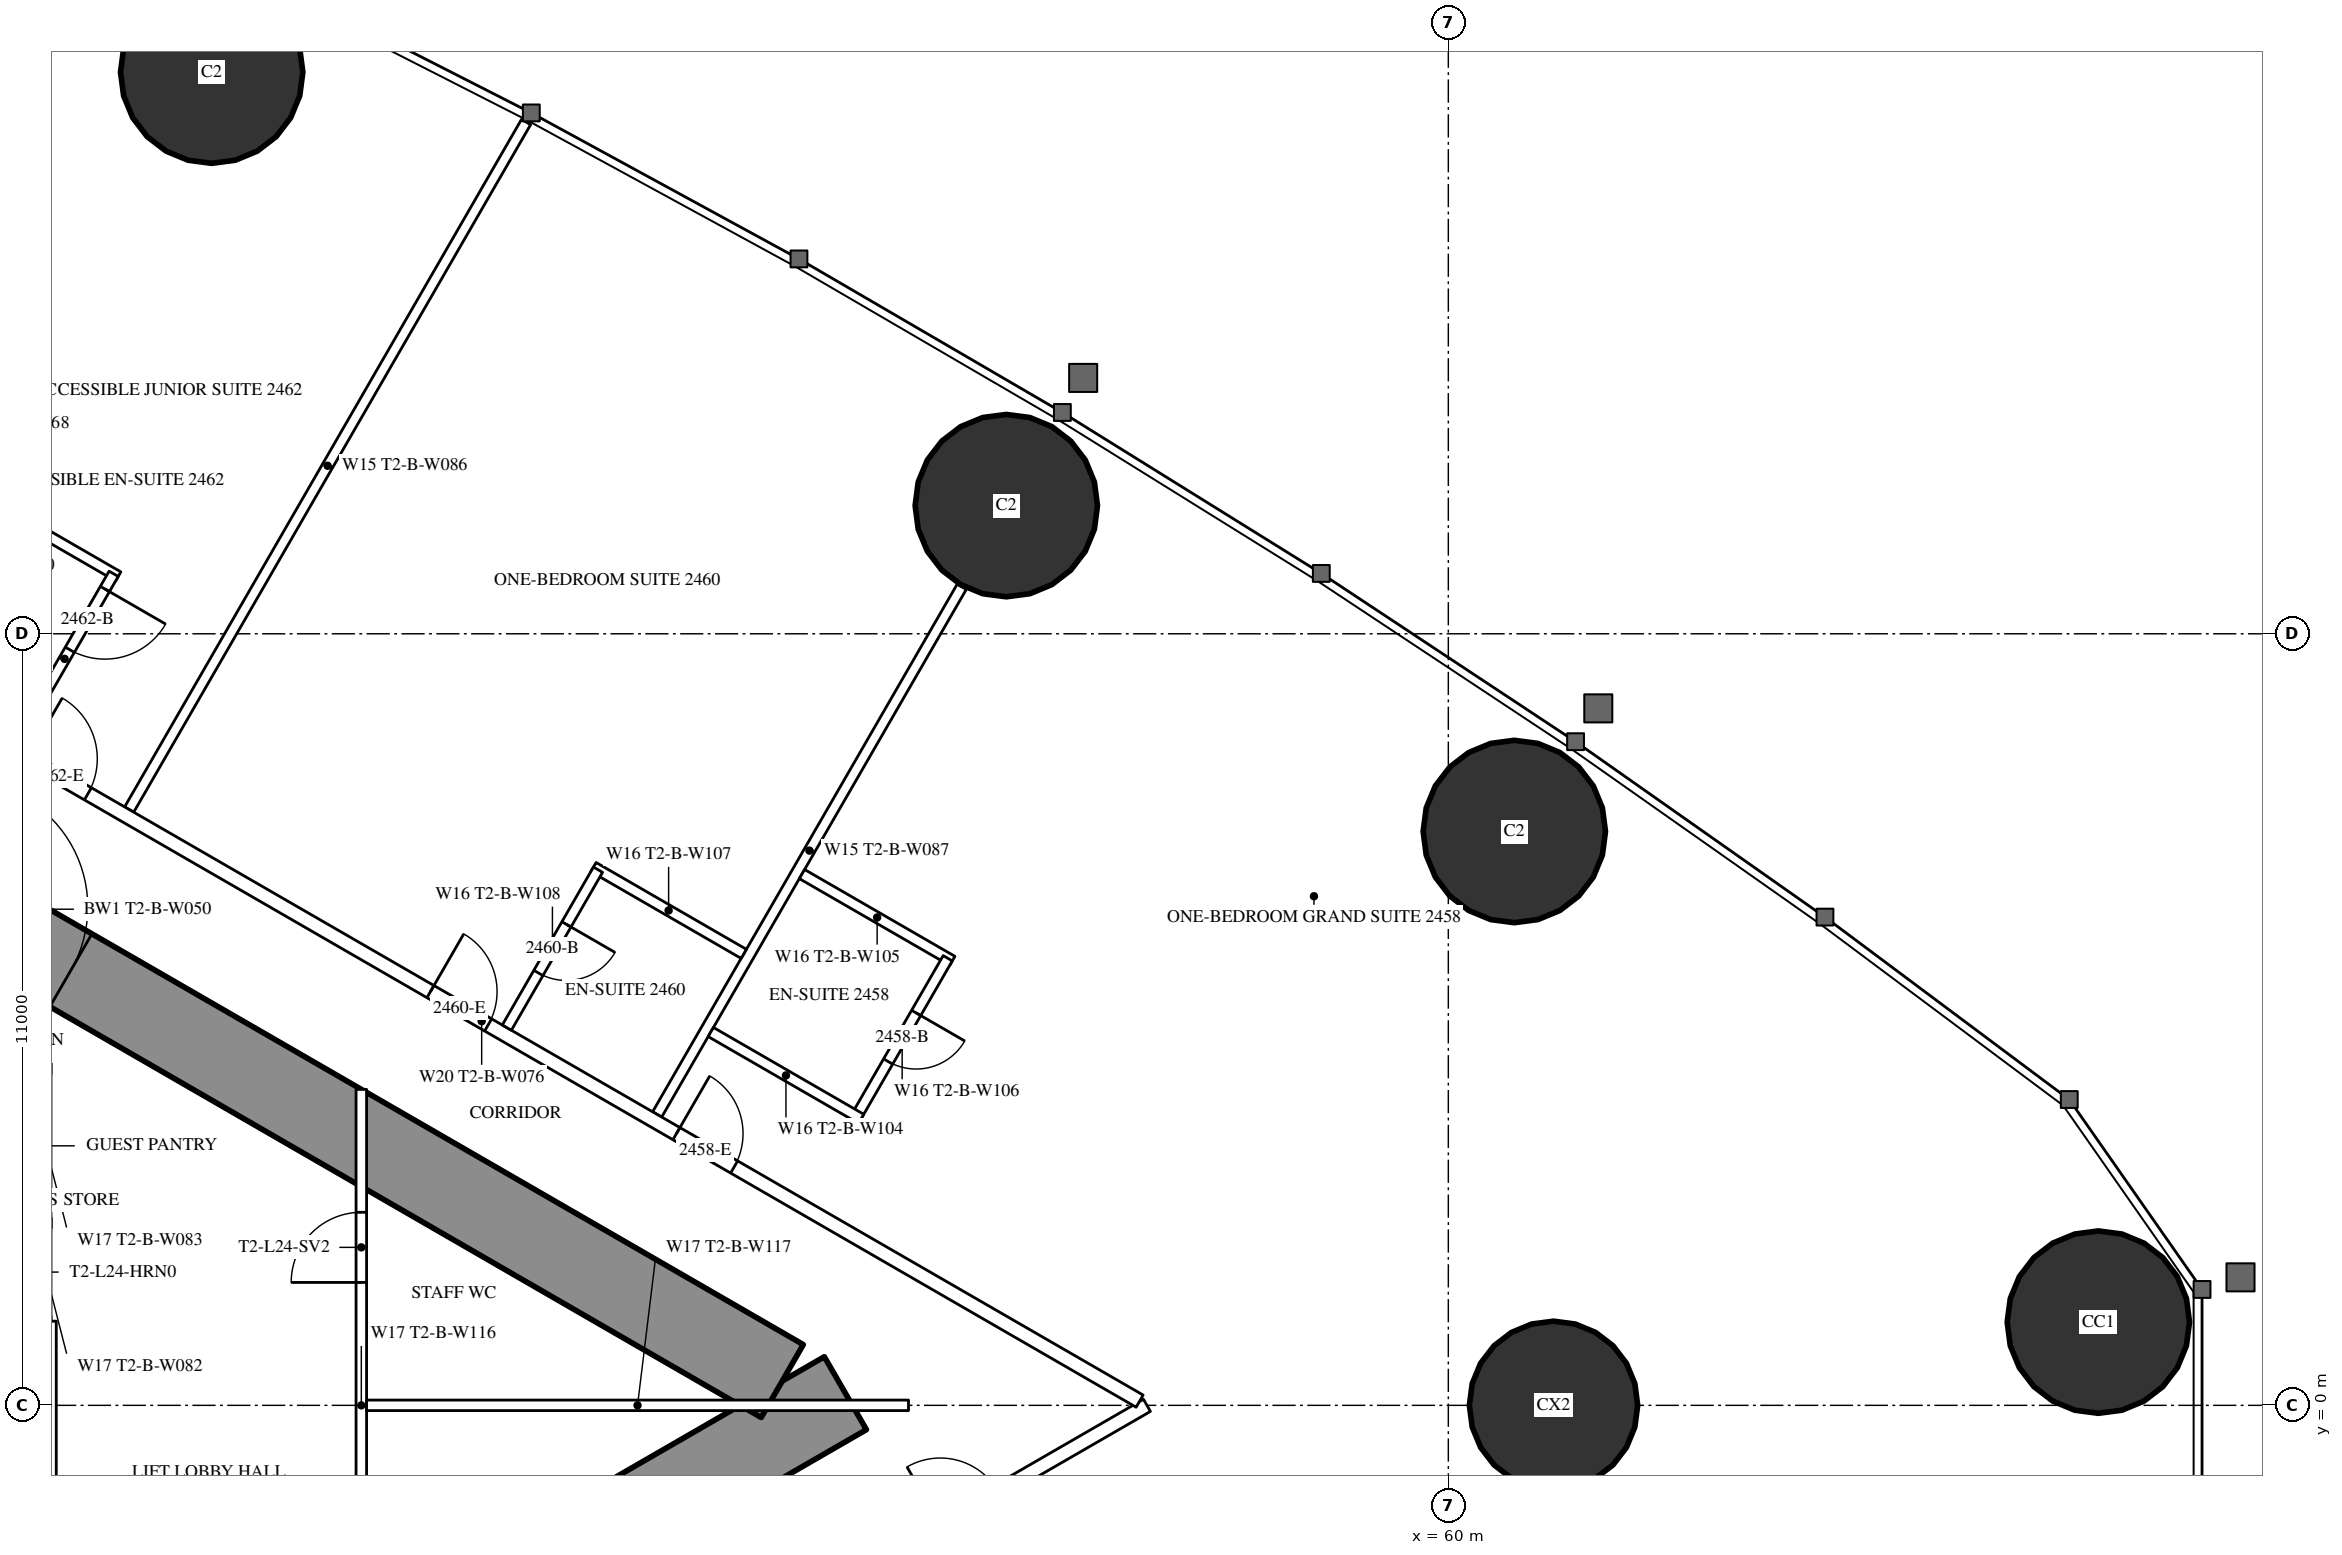
"""IFC4 building model, lengths in metres.
Left out: names, types, materials, properties, quantities, classifications, styles, units other than length and angle.
Written with IfcOpenShell. Run it as: python <this file> out.ifc"""

import sys

from ifc_helpers import new_model, si_unit, direction, frame, frame_2d, origin, origin_2d, place, context, subcontext, project, spatial, rectangle, circle, hollow_circle, extrude, element, fill, save


model = new_model("IFC4")
c1 = context("Model", 3, precision=1e-05, world=origin(), true_north=direction((0.0, 1.0)))
c2 = subcontext(c1, "Body", "Model", "MODEL_VIEW")
j1 = project(units=[si_unit("LENGTHUNIT", "METRE"), si_unit("PLANEANGLEUNIT", "RADIAN")], contexts=[c1])
p1 = place(None, origin())
s1 = spatial("IfcSite", under=j1, at=p1, CompositionType="ELEMENT")
p2 = place(p1, origin())
s2 = spatial("IfcBuilding", under=s1, at=p2, CompositionType="ELEMENT")
p3 = place(p2, frame((0.0, 0.0, 94.1)))
s3 = spatial("IfcBuildingStorey", under=s2, at=p3, CompositionType="ELEMENT", Elevation=94.1)
for number, where, z_axis, x_axis in (
    (1, (69.269, 1.187, 0.0), (0.0, 0.0, 1.0), (1.0, 0.0, 0.0)),
    (2, (60.941, 8.181, 0.0), (0.0, 0.0, 1.0), (1.0, 0.0, 0.0)),
    (3, (53.697, 12.827, 0.0), (0.0, 0.0, 1.0), (1.0, 0.0, 0.0)),
    (4, (42.366, 19.007, 0.0), (0.0, 0.0, 1.0), (1.0, 0.0, 0.0)),
):
    element("IfcColumn", number, at=place(p3, frame(where, z_axis=z_axis, x_axis=x_axis)), inside=s3, PredefinedType="COLUMN", context=c2, shape_type="SweptSolid", body=[
        extrude(hollow_circle(Radius=1.3, WallThickness=0.1, at=origin_2d()), origin(), (0.0, 0.0, 1.0), 3.5),
    ])
p4 = place(p3, frame((61.5, 0.0, 0.0), z_axis=(0.0, 0.0, 1.0), x_axis=(1.0, 0.0, 0.0)))
e5 = element("IfcColumn", 5, at=p4, inside=s3, PredefinedType="COLUMN", context=c2, shape_type="SweptSolid", body=[
    extrude(circle(Radius=1.2, at=origin_2d()), origin(), (0.0, 0.0, 1.0), 3.5),
])
p5 = place(p3, frame((27.2, -13.8, 0.0), z_axis=(0.0, 0.0, 1.0), x_axis=(0.866027159892, 0.499996958321, 0.0)))
e6 = element("IfcWall", 6, at=p5, inside=s3, PredefinedType="SHEAR", context=c2, shape_type="SweptSolid", body=[
    extrude(rectangle(XDim=27.947, YDim=1.2, at=frame_2d((13.973, 0.0))), origin(), (0.0, 0.0, 1.0), 3.5),
])
p6 = place(p5, frame((4.6, 0.0, 0.0)))
e7 = element("IfcOpeningElement", 7, at=p6, cuts=e6, PredefinedType="OPENING", context=c2, shape_type="SweptSolid", body=[
    extrude(rectangle(XDim=1.0, YDim=2.2, at=frame_2d((0.5, 1.1))), frame((0.0, 0.61, 0.0), z_axis=(0.0, -1.0, 0.0), x_axis=(1.0, 0.0, 0.0)), (0.0, 0.0, 1.0), 1.22),
])
p7 = place(p5, frame((13.395, 0.0, 0.0)))
e8 = element("IfcOpeningElement", 8, at=p7, cuts=e6, PredefinedType="OPENING", context=c2, shape_type="SweptSolid", body=[
    extrude(rectangle(XDim=1.8, YDim=2.2, at=frame_2d((0.9, 1.1))), frame((0.0, 0.61, 0.0), z_axis=(0.0, -1.0, 0.0), x_axis=(1.0, 0.0, 0.0)), (0.0, 0.0, 1.0), 1.22),
])
p8 = place(p3, frame((27.2, 13.8, 0.0), z_axis=(0.0, 0.0, 1.0), x_axis=(0.866024515034, -0.500001539357, 0.0)))
e9 = element("IfcWall", 9, at=p8, inside=s3, PredefinedType="SHEAR", context=c2, shape_type="SweptSolid", body=[
    extrude(rectangle(XDim=26.907, YDim=1.2, at=frame_2d((13.454, 0.0))), origin(), (0.0, 0.0, 1.0), 3.5),
])
p9 = place(p8, frame((4.6, 0.0, 0.0)))
e10 = element("IfcOpeningElement", 10, at=p9, cuts=e9, PredefinedType="OPENING", context=c2, shape_type="SweptSolid", body=[
    extrude(rectangle(XDim=1.0, YDim=2.2, at=frame_2d((0.5, 1.1))), frame((0.0, 0.61, 0.0), z_axis=(0.0, -1.0, 0.0), x_axis=(1.0, 0.0, 0.0)), (0.0, 0.0, 1.0), 1.22),
])
p10 = place(p8, frame((13.395, 0.0, 0.0)))
e11 = element("IfcOpeningElement", 11, at=p10, cuts=e9, PredefinedType="OPENING", context=c2, shape_type="SweptSolid", body=[
    extrude(rectangle(XDim=1.8, YDim=2.2, at=frame_2d((0.9, 1.1))), frame((0.0, 0.61, 0.0), z_axis=(0.0, -1.0, 0.0), x_axis=(1.0, 0.0, 0.0)), (0.0, 0.0, 1.0), 1.22),
])
p11 = place(p3, frame((41.19, 8.494, 0.0), z_axis=(0.0, 0.0, 1.0), x_axis=(0.49999258054, 0.866029687369, 0.0)))
e12 = element("IfcWall", 12, at=p11, inside=s3, PredefinedType="PARTITIONING", context=c2, shape_type="SweptSolid", body=[
    extrude(rectangle(XDim=11.318, YDim=0.15, at=frame_2d((5.659, 0.0))), origin(), (0.0, 0.0, 1.0), 3.25),
])
p12 = place(p3, frame((48.719, 4.147, 0.0), z_axis=(0.0, 0.0, 1.0), x_axis=(0.499993328235, 0.866029255696, 0.0)))
e13 = element("IfcWall", 13, at=p12, inside=s3, PredefinedType="PARTITIONING", context=c2, shape_type="SweptSolid", body=[
    extrude(rectangle(XDim=8.686, YDim=0.15, at=frame_2d((4.343, 0.0))), origin(), (0.0, 0.0, 1.0), 2.2),
])
p13 = place(p3, frame((37.96, -10.243, 0.0), z_axis=(0.0, 0.0, 1.0), x_axis=(0.866026429433, 0.499998223521, 0.0)))
e14 = element("IfcWall", 14, at=p13, inside=s3, PredefinedType="PARTITIONING", context=c2, shape_type="SweptSolid", body=[
    extrude(rectangle(XDim=20.487, YDim=0.2, at=frame_2d((10.243, 0.0))), origin(), (0.0, 0.0, 1.0), 3.25),
])
p14 = place(p13, frame((4.047, 0.0, 0.0)))
e15 = element("IfcOpeningElement", 15, at=p14, cuts=e14, PredefinedType="OPENING", context=c2, shape_type="SweptSolid", body=[
    extrude(rectangle(XDim=0.95, YDim=2.2, at=frame_2d((0.475, 1.1))), frame((0.0, 0.11, 0.0), z_axis=(0.0, -1.0, 0.0), x_axis=(1.0, 0.0, 0.0)), (0.0, 0.0, 1.0), 0.22),
])
p15 = place(p13, frame((11.04, 0.0, 0.0)))
e16 = element("IfcOpeningElement", 16, at=p15, cuts=e14, PredefinedType="OPENING", context=c2, shape_type="SweptSolid", body=[
    extrude(rectangle(XDim=0.95, YDim=2.2, at=frame_2d((0.475, 1.1))), frame((0.0, 0.11, 0.0), z_axis=(0.0, -1.0, 0.0), x_axis=(1.0, 0.0, 0.0)), (0.0, 0.0, 1.0), 0.22),
])
p16 = place(p13, frame((13.035, 0.0, 0.0)))
e17 = element("IfcOpeningElement", 17, at=p16, cuts=e14, PredefinedType="OPENING", context=c2, shape_type="SweptSolid", body=[
    extrude(rectangle(XDim=0.95, YDim=2.2, at=frame_2d((0.475, 1.1))), frame((0.0, 0.11, 0.0), z_axis=(0.0, -1.0, 0.0), x_axis=(1.0, 0.0, 0.0)), (0.0, 0.0, 1.0), 0.22),
])
p17 = place(p13, frame((17.085, 0.0, 0.0)))
e18 = element("IfcOpeningElement", 18, at=p17, cuts=e14, PredefinedType="OPENING", context=c2, shape_type="SweptSolid", body=[
    extrude(rectangle(XDim=0.95, YDim=2.2, at=frame_2d((0.475, 1.1))), frame((0.0, 0.11, 0.0), z_axis=(0.0, -1.0, 0.0), x_axis=(1.0, 0.0, 0.0)), (0.0, 0.0, 1.0), 0.22),
])
p18 = place(p13, frame((1.048, 0.0, 0.0)))
e19 = element("IfcOpeningElement", 19, at=p18, cuts=e14, PredefinedType="OPENING", context=c2, shape_type="SweptSolid", body=[
    extrude(rectangle(XDim=1.8, YDim=2.2, at=frame_2d((0.9, 1.1))), frame((0.0, 0.11, 0.0), z_axis=(0.0, -1.0, 0.0), x_axis=(1.0, 0.0, 0.0)), (0.0, 0.0, 1.0), 0.22),
])
p19 = place(p3, frame((36.834, 10.894, 0.0), z_axis=(0.0, 0.0, 1.0), x_axis=(0.866028157229, -0.499995230863, 0.0)))
e20 = element("IfcWall", 20, at=p19, inside=s3, PredefinedType="PARTITIONING", context=c2, shape_type="SweptSolid", body=[
    extrude(rectangle(XDim=21.667, YDim=0.2, at=frame_2d((10.833, 0.0))), origin(), (0.0, 0.0, 1.0), 3.25),
])
p20 = place(p19, frame((14.04, 0.0, 0.0)))
e21 = element("IfcOpeningElement", 21, at=p20, cuts=e20, PredefinedType="OPENING", context=c2, shape_type="SweptSolid", body=[
    extrude(rectangle(XDim=0.95, YDim=2.2, at=frame_2d((0.475, 1.1))), frame((0.0, 0.11, 0.0), z_axis=(0.0, -1.0, 0.0), x_axis=(1.0, 0.0, 0.0)), (0.0, 0.0, 1.0), 0.22),
])
p21 = place(p19, frame((9.99, 0.0, 0.0)))
e22 = element("IfcOpeningElement", 22, at=p21, cuts=e20, PredefinedType="OPENING", context=c2, shape_type="SweptSolid", body=[
    extrude(rectangle(XDim=0.95, YDim=2.2, at=frame_2d((0.475, 1.1))), frame((0.0, 0.11, 0.0), z_axis=(0.0, -1.0, 0.0), x_axis=(1.0, 0.0, 0.0)), (0.0, 0.0, 1.0), 0.22),
])
p22 = place(p19, frame((3.35, 0.0, 0.0)))
e23 = element("IfcOpeningElement", 23, at=p22, cuts=e20, PredefinedType="OPENING", context=c2, shape_type="SweptSolid", body=[
    extrude(rectangle(XDim=1.0, YDim=2.2, at=frame_2d((0.5, 1.1))), frame((0.0, 0.11, 0.0), z_axis=(0.0, -1.0, 0.0), x_axis=(1.0, 0.0, 0.0)), (0.0, 0.0, 1.0), 0.22),
])
p23 = place(p3, frame((50.783, 7.574, 0.0), z_axis=(0.0, 0.0, 1.0), x_axis=(0.866006523861, -0.500032699561, 0.0)))
e24 = element("IfcWall", 24, at=p23, inside=s3, PredefinedType="PARTITIONING", context=c2, shape_type="SweptSolid", body=[
    extrude(rectangle(XDim=2.475, YDim=0.15, at=frame_2d((1.237, 0.0))), origin(), (0.0, 0.0, 1.0), 3.25),
])
p24 = place(p3, frame((51.562, 4.123, 0.0), z_axis=(0.0, 0.0, 1.0), x_axis=(0.49997716683, 0.86603858612, 0.0)))
e25 = element("IfcWall", 25, at=p24, inside=s3, PredefinedType="PARTITIONING", context=c2, shape_type="SweptSolid", body=[
    extrude(rectangle(XDim=2.6, YDim=0.15, at=frame_2d((1.3, 0.0))), origin(), (0.0, 0.0, 1.0), 3.25),
])
p25 = place(p24, frame((0.9, 0.0, 0.0)))
e26 = element("IfcOpeningElement", 26, at=p25, cuts=e25, PredefinedType="OPENING", context=c2, shape_type="SweptSolid", body=[
    extrude(rectangle(XDim=0.8, YDim=2.2, at=frame_2d((0.4, 1.1))), frame((0.0, 0.085, 0.0), z_axis=(0.0, -1.0, 0.0), x_axis=(1.0, 0.0, 0.0)), (0.0, 0.0, 1.0), 0.17),
])
for number, where, z_axis, x_axis in (
    (27, (49.483, 5.323, 0.0), (0.0, 0.0, 1.0), (0.866, -0.5, 0.0)),
    (28, (47.81, 7.674, 0.0), (0.0, 0.0, 1.0), (0.866, -0.5, 0.0)),
):
    element("IfcWall", number, at=place(p3, frame(where, z_axis=z_axis, x_axis=x_axis)), inside=s3, PredefinedType="PARTITIONING", context=c2, shape_type="SweptSolid", body=[
        extrude(rectangle(XDim=2.475, YDim=0.15, at=frame_2d((1.238, 0.0))), origin(), (0.0, 0.0, 1.0), 3.25),
    ])
p26 = place(p3, frame((46.575, 5.385, 0.0), z_axis=(0.0, 0.0, 1.0), x_axis=(0.500006934395, 0.866021400173, 0.0)))
e29 = element("IfcWall", 29, at=p26, inside=s3, PredefinedType="PARTITIONING", context=c2, shape_type="SweptSolid", body=[
    extrude(rectangle(XDim=2.6, YDim=0.15, at=frame_2d((1.3, 0.0))), origin(), (0.0, 0.0, 1.0), 3.25),
])
p27 = place(p26, frame((0.9, 0.0, 0.0)))
e30 = element("IfcOpeningElement", 30, at=p27, cuts=e29, PredefinedType="OPENING", context=c2, shape_type="SweptSolid", body=[
    extrude(rectangle(XDim=0.8, YDim=2.2, at=frame_2d((0.4, 1.1))), frame((0.0, 0.085, 0.0), z_axis=(0.0, -1.0, 0.0), x_axis=(1.0, 0.0, 0.0)), (0.0, 0.0, 1.0), 0.17),
])
p28 = place(p3, frame((38.544, 13.255, 0.0), z_axis=(0.0, 0.0, 1.0), x_axis=(0.866018712932, -0.500011588718, 0.0)))
e31 = element("IfcWall", 31, at=p28, inside=s3, PredefinedType="PARTITIONING", context=c2, shape_type="SweptSolid", body=[
    extrude(rectangle(XDim=2.875, YDim=0.15, at=frame_2d((1.438, 0.0))), origin(), (0.0, 0.0, 1.0), 3.25),
])
p29 = place(p3, frame((39.569, 9.43, 0.0), z_axis=(0.0, 0.0, 1.0), x_axis=(0.49998411664, 0.866034573852, 0.0)))
e32 = element("IfcWall", 32, at=p29, inside=s3, PredefinedType="PARTITIONING", context=c2, shape_type="SweptSolid", body=[
    extrude(rectangle(XDim=2.8, YDim=0.15, at=frame_2d((1.4, 0.0))), origin(), (0.0, 0.0, 1.0), 3.25),
])
p30 = place(p29, frame((1.55, 0.0, 0.0)))
e33 = element("IfcOpeningElement", 33, at=p30, cuts=e32, PredefinedType="OPENING", context=c2, shape_type="SweptSolid", body=[
    extrude(rectangle(XDim=1.0, YDim=2.2, at=frame_2d((0.5, 1.1))), frame((0.0, 0.085, 0.0), z_axis=(0.0, -1.0, 0.0), x_axis=(1.0, 0.0, 0.0)), (0.0, 0.0, 1.0), 0.17),
])
p31 = place(p3, frame((40.075, -5.674, 0.0), z_axis=(0.0, 0.0, 1.0), x_axis=(0.0, 1.0, 0.0)))
e34 = element("IfcWall", 34, at=p31, inside=s3, PredefinedType="PARTITIONING", context=c2, shape_type="SweptSolid", body=[
    extrude(rectangle(XDim=6.874, YDim=0.15, at=frame_2d((3.437, 0.0))), origin(), (0.0, 0.0, 1.0), 3.25),
])
p32 = place(p31, frame((2.537, 0.0, 0.0)))
e35 = element("IfcOpeningElement", 35, at=p32, cuts=e34, PredefinedType="OPENING", context=c2, shape_type="SweptSolid", body=[
    extrude(rectangle(XDim=1.8, YDim=2.2, at=frame_2d((0.9, 1.1))), frame((0.0, 0.085, 0.0), z_axis=(0.0, -1.0, 0.0), x_axis=(1.0, 0.0, 0.0)), (0.0, 0.0, 1.0), 0.17),
])
p33 = place(p3, frame((44.5, -4.505, 0.0), z_axis=(0.0, 0.0, 1.0), x_axis=(0.0, 1.0, 0.0)))
e36 = element("IfcWall", 36, at=p33, inside=s3, PredefinedType="PARTITIONING", context=c2, shape_type="SweptSolid", body=[
    extrude(rectangle(XDim=9.009, YDim=0.15, at=frame_2d((4.505, 0.0))), origin(), (0.0, 0.0, 1.0), 2.45),
])
p34 = place(p33, frame((1.752, 0.0, 0.0)))
e37 = element("IfcOpeningElement", 37, at=p34, cuts=e36, PredefinedType="OPENING", context=c2, shape_type="SweptSolid", body=[
    extrude(rectangle(XDim=1.0, YDim=2.2, at=frame_2d((0.5, 1.1))), frame((0.0, 0.085, 0.0), z_axis=(0.0, -1.0, 0.0), x_axis=(1.0, 0.0, 0.0)), (0.0, 0.0, 1.0), 0.17),
])
p35 = place(p33, frame((6.257, 0.0, 0.0)))
e38 = element("IfcOpeningElement", 38, at=p35, cuts=e36, PredefinedType="OPENING", context=c2, shape_type="SweptSolid", body=[
    extrude(rectangle(XDim=1.0, YDim=2.2, at=frame_2d((0.5, 1.1))), frame((0.0, 0.085, 0.0), z_axis=(0.0, -1.0, 0.0), x_axis=(1.0, 0.0, 0.0)), (0.0, 0.0, 1.0), 0.17),
])
p36 = place(p3, frame((44.575, 0.0, 0.0), z_axis=(0.0, 0.0, 1.0), x_axis=(1.0, 0.0, 0.0)))
e39 = element("IfcWall", 39, at=p36, inside=s3, PredefinedType="PARTITIONING", context=c2, shape_type="SweptSolid", body=[
    extrude(rectangle(XDim=7.727, YDim=0.15, at=frame_2d((3.864, 0.0))), origin(), (0.0, 0.0, 1.0), 2.2),
])
p37 = place(p25, origin())
e40 = element("IfcDoor", 40, at=p37, inside=s3, OperationType="SINGLE_SWING_RIGHT", PredefinedType="DOOR", context=c2, shape_type="SweptSolid", body=[
    extrude(rectangle(XDim=0.8, YDim=2.2, at=frame_2d((0.4, 1.1))), frame((0.0, 0.025, 0.0), z_axis=(0.0, -1.0, 0.0), x_axis=(1.0, 0.0, 0.0)), (0.0, 0.0, 1.0), 0.05),
])
fill(e26, e40)
p38 = place(p20, origin())
e41 = element("IfcDoor", 41, at=p38, inside=s3, OperationType="SINGLE_SWING_LEFT", PredefinedType="DOOR", context=c2, shape_type="SweptSolid", body=[
    extrude(rectangle(XDim=0.95, YDim=2.2, at=frame_2d((0.475, 1.1))), frame((0.0, 0.025, 0.0), z_axis=(0.0, -1.0, 0.0), x_axis=(1.0, 0.0, 0.0)), (0.0, 0.0, 1.0), 0.05),
])
fill(e21, e41)
p39 = place(p27, origin())
e42 = element("IfcDoor", 42, at=p39, inside=s3, OperationType="SINGLE_SWING_RIGHT", PredefinedType="DOOR", context=c2, shape_type="SweptSolid", body=[
    extrude(rectangle(XDim=0.8, YDim=2.2, at=frame_2d((0.4, 1.1))), frame((0.0, 0.025, 0.0), z_axis=(0.0, -1.0, 0.0), x_axis=(1.0, 0.0, 0.0)), (0.0, 0.0, 1.0), 0.05),
])
fill(e30, e42)
p40 = place(p21, origin())
e43 = element("IfcDoor", 43, at=p40, inside=s3, OperationType="SINGLE_SWING_LEFT", PredefinedType="DOOR", context=c2, shape_type="SweptSolid", body=[
    extrude(rectangle(XDim=0.95, YDim=2.2, at=frame_2d((0.475, 1.1))), frame((0.0, 0.025, 0.0), z_axis=(0.0, -1.0, 0.0), x_axis=(1.0, 0.0, 0.0)), (0.0, 0.0, 1.0), 0.05),
])
fill(e22, e43)
p41 = place(p30, origin())
e44 = element("IfcDoor", 44, at=p41, inside=s3, OperationType="SINGLE_SWING_RIGHT", PredefinedType="DOOR", context=c2, shape_type="SweptSolid", body=[
    extrude(rectangle(XDim=1.0, YDim=2.2, at=frame_2d((0.5, 1.1))), frame((0.0, 0.025, 0.0), z_axis=(0.0, -1.0, 0.0), x_axis=(1.0, 0.0, 0.0)), (0.0, 0.0, 1.0), 0.05),
])
fill(e33, e44)
p42 = place(p22, origin())
e45 = element("IfcDoor", 45, at=p42, inside=s3, OperationType="SINGLE_SWING_LEFT", PredefinedType="DOOR", context=c2, shape_type="SweptSolid", body=[
    extrude(rectangle(XDim=1.0, YDim=2.2, at=frame_2d((0.5, 1.1))), frame((0.0, 0.025, 0.0), z_axis=(0.0, -1.0, 0.0), x_axis=(1.0, 0.0, 0.0)), (0.0, 0.0, 1.0), 0.05),
])
fill(e23, e45)
p43 = place(p35, origin())
e46 = element("IfcDoor", 46, at=p43, inside=s3, OperationType="SINGLE_SWING_LEFT", PredefinedType="DOOR", context=c2, shape_type="SweptSolid", body=[
    extrude(rectangle(XDim=1.0, YDim=2.2, at=frame_2d((0.5, 1.1))), frame((0.0, 0.025, 0.0), z_axis=(0.0, -1.0, 0.0), x_axis=(1.0, 0.0, 0.0)), (0.0, 0.0, 1.0), 0.05),
])
fill(e38, e46)
p44 = place(p10, origin())
e47 = element("IfcDoor", 47, at=p44, inside=s3, OperationType="DOUBLE_DOOR_SINGLE_SWING", PredefinedType="DOOR", context=c2, shape_type="SweptSolid", body=[
    extrude(rectangle(XDim=1.8, YDim=2.2, at=frame_2d((0.9, 1.1))), frame((0.0, 0.025, 0.0), z_axis=(0.0, -1.0, 0.0), x_axis=(1.0, 0.0, 0.0)), (0.0, 0.0, 1.0), 0.05),
])
fill(e11, e47)
save(model, sys.argv[1])
